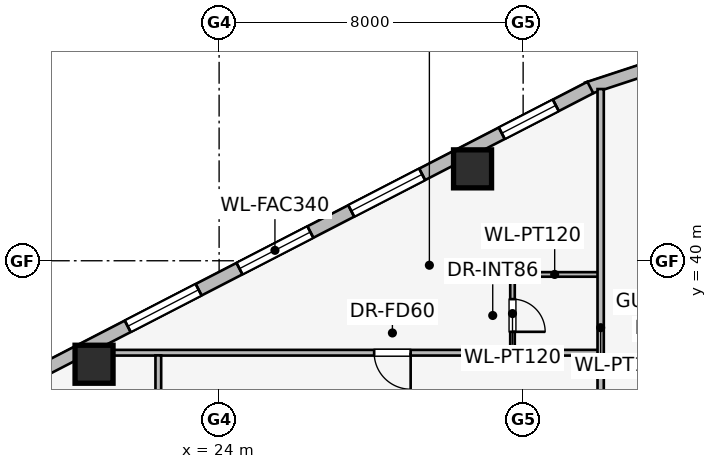
"""IFC4 building model, lengths in metres.
Left out: names, types, materials, properties, quantities, classifications, styles, units other than length and angle.
Written with IfcOpenShell. Run it as: python <this file> out.ifc"""

import sys

from ifc_helpers import new_model, si_unit, direction, frame, frame_2d, origin, origin_2d, place, context, subcontext, project, spatial, rectangle, extrude, element, fill, save


model = new_model("IFC4")
c1 = context("Model", 3, precision=1e-05, world=origin(), true_north=direction((0.0, 1.0)))
c2 = subcontext(c1, "Body", "Model", "MODEL_VIEW")
j1 = project(units=[si_unit("LENGTHUNIT", "METRE"), si_unit("PLANEANGLEUNIT", "RADIAN")], contexts=[c1])
p1 = place(None, origin())
s1 = spatial("IfcSite", under=j1, at=p1, CompositionType="ELEMENT")
p2 = place(p1, origin())
s2 = spatial("IfcBuilding", under=s1, at=p2, CompositionType="ELEMENT")
p3 = place(p2, frame((0.0, 0.0, 122.25)))
s3 = spatial("IfcBuildingStorey", under=s2, at=p3, CompositionType="ELEMENT", Elevation=122.25)
for number, where, z_axis, x_axis in (
    (1, (30.669, 42.418, 0.0), (0.0, 0.0, 1.0), (1.0, 0.0, 0.0)),
    (2, (20.709, 37.277, 0.0), (0.0, 0.0, 1.0), (1.0, 0.0, 0.0)),
):
    element("IfcColumn", number, at=place(p3, frame(where, z_axis=z_axis, x_axis=x_axis)), inside=s3, PredefinedType="COLUMN", context=c2, shape_type="SweptSolid", body=[
        extrude(rectangle(XDim=1.0, YDim=1.0, at=origin_2d()), origin(), (0.0, 0.0, 1.0), 3.45),
    ])
p4 = place(p3, frame((33.681, 44.532, 0.0), z_axis=(0.0, 0.0, 1.0), x_axis=(0.949937416267, 0.312440242569, 0.0)))
e3 = element("IfcWall", 3, at=p4, inside=s3, PredefinedType="STANDARD", context=c2, shape_type="SweptSolid", body=[
    extrude(rectangle(XDim=1.722, YDim=0.33, at=frame_2d((0.861, 0.0))), origin(), (0.0, 0.0, 1.0), 3.19),
])
p5 = place(p3, frame((17.169, 35.99, 0.0), z_axis=(0.0, 0.0, 1.0), x_axis=(0.888613612362, 0.458656568606, 0.0)))
e4 = element("IfcWall", 4, at=p5, inside=s3, PredefinedType="STANDARD", context=c2, shape_type="SweptSolid", body=[
    extrude(rectangle(XDim=18.681, YDim=0.34, at=frame_2d((9.34, 0.0))), origin(), (0.0, 0.0, 1.0), 3.19),
])
p6 = place(p5, frame((1.023, 0.0, 0.75)))
e5 = element("IfcOpeningElement", 5, at=p6, cuts=e4, PredefinedType="OPENING", context=c2, shape_type="SweptSolid", body=[
    extrude(rectangle(XDim=1.6, YDim=1.55, at=frame_2d((0.8, 0.775))), frame((0.0, 0.18, 0.0), z_axis=(0.0, -1.0, 0.0), x_axis=(1.0, 0.0, 0.0)), (0.0, 0.0, 1.0), 0.36),
])
p7 = place(p5, frame((4.981, 0.0, 0.75)))
e6 = element("IfcOpeningElement", 6, at=p7, cuts=e4, PredefinedType="OPENING", context=c2, shape_type="SweptSolid", body=[
    extrude(rectangle(XDim=2.1, YDim=1.5, at=frame_2d((1.05, 0.75))), frame((0.0, 0.18, 0.0), z_axis=(0.0, -1.0, 0.0), x_axis=(1.0, 0.0, 0.0)), (0.0, 0.0, 1.0), 0.36),
])
p8 = place(p5, frame((8.29, 0.0, 0.75)))
e7 = element("IfcOpeningElement", 7, at=p8, cuts=e4, PredefinedType="OPENING", context=c2, shape_type="SweptSolid", body=[
    extrude(rectangle(XDim=2.1, YDim=1.5, at=frame_2d((1.05, 0.75))), frame((0.0, 0.18, 0.0), z_axis=(0.0, -1.0, 0.0), x_axis=(1.0, 0.0, 0.0)), (0.0, 0.0, 1.0), 0.36),
])
p9 = place(p5, frame((11.6, 0.0, 0.75)))
e8 = element("IfcOpeningElement", 8, at=p9, cuts=e4, PredefinedType="OPENING", context=c2, shape_type="SweptSolid", body=[
    extrude(rectangle(XDim=2.1, YDim=1.5, at=frame_2d((1.05, 0.75))), frame((0.0, 0.18, 0.0), z_axis=(0.0, -1.0, 0.0), x_axis=(1.0, 0.0, 0.0)), (0.0, 0.0, 1.0), 0.36),
])
p10 = place(p5, frame((16.058, 0.0, 0.75)))
e9 = element("IfcOpeningElement", 9, at=p10, cuts=e4, PredefinedType="OPENING", context=c2, shape_type="SweptSolid", body=[
    extrude(rectangle(XDim=1.6, YDim=1.55, at=frame_2d((0.8, 0.775))), frame((0.0, 0.18, 0.0), z_axis=(0.0, -1.0, 0.0), x_axis=(1.0, 0.0, 0.0)), (0.0, 0.0, 1.0), 0.36),
])
p11 = place(p3, frame((34.0, 39.64, 0.0), z_axis=(0.0, 0.0, 1.0), x_axis=(-1.0, 0.0, 0.0)))
e10 = element("IfcWall", 10, at=p11, inside=s3, PredefinedType="PARTITIONING", context=c2, shape_type="SweptSolid", body=[
    extrude(rectangle(XDim=2.34, YDim=0.12, at=frame_2d((1.17, 0.0))), origin(), (0.0, 0.0, 1.0), 3.19),
])
p12 = place(p3, frame((31.72, 39.64, 0.0), z_axis=(0.0, 0.0, 1.0), x_axis=(0.0, -1.0, 0.0)))
e11 = element("IfcWall", 11, at=p12, inside=s3, PredefinedType="PARTITIONING", context=c2, shape_type="SweptSolid", body=[
    extrude(rectangle(XDim=2.06, YDim=0.12, at=frame_2d((1.03, 0.0))), origin(), (0.0, 0.0, 1.0), 3.19),
])
p13 = place(p12, frame((0.65, 0.0, 0.0)))
e12 = element("IfcOpeningElement", 12, at=p13, cuts=e11, PredefinedType="OPENING", context=c2, shape_type="SweptSolid", body=[
    extrude(rectangle(XDim=0.86, YDim=2.0, at=frame_2d((0.43, 1.0))), frame((0.0, 0.07, 0.0), z_axis=(0.0, -1.0, 0.0), x_axis=(1.0, 0.0, 0.0)), (0.0, 0.0, 1.0), 0.14),
])
p14 = place(p3, frame((34.0, 37.58, 0.0), z_axis=(0.0, 0.0, 1.0), x_axis=(-1.0, 0.0, 0.0)))
e13 = element("IfcWall", 13, at=p14, inside=s3, PredefinedType="PARTITIONING", context=c2, shape_type="SweptSolid", body=[
    extrude(rectangle(XDim=13.707, YDim=0.15, at=frame_2d((6.854, 0.0))), origin(), (0.0, 0.0, 1.0), 3.19),
])
p15 = place(p14, frame((4.96, 0.0, 0.0)))
e14 = element("IfcOpeningElement", 14, at=p15, cuts=e13, PredefinedType="OPENING", context=c2, shape_type="SweptSolid", body=[
    extrude(rectangle(XDim=0.96, YDim=2.0, at=frame_2d((0.48, 1.0))), frame((0.0, 0.085, 0.0), z_axis=(0.0, -1.0, 0.0), x_axis=(1.0, 0.0, 0.0)), (0.0, 0.0, 1.0), 0.17),
])
p16 = place(p3, frame((34.04, 31.96, 0.0), z_axis=(0.0, 0.0, 1.0), x_axis=(0.0, 1.0, 0.0)))
e15 = element("IfcWall", 15, at=p16, inside=s3, PredefinedType="PARTITIONING", context=c2, shape_type="SweptSolid", body=[
    extrude(rectangle(XDim=12.558, YDim=0.165, at=frame_2d((6.279, 0.0))), origin(), (0.0, 0.0, 1.0), 3.19),
])
p17 = place(p3, frame((22.4, 36.08, 0.0), z_axis=(0.0, 0.0, 1.0), x_axis=(0.0, 1.0, 0.0)))
e16 = element("IfcWall", 16, at=p17, inside=s3, PredefinedType="PARTITIONING", context=c2, shape_type="SweptSolid", body=[
    extrude(rectangle(XDim=1.43, YDim=0.15, at=frame_2d((0.715, 0.0))), origin(), (0.0, 0.0, 1.0), 3.19),
])
p18 = place(p7, origin())
e17 = element("IfcWindow", 17, at=p18, inside=s3, PartitioningType="SINGLE_PANEL", PredefinedType="WINDOW", context=c2, shape_type="SweptSolid", body=[
    extrude(rectangle(XDim=2.1, YDim=1.5, at=frame_2d((1.05, 0.75))), frame((0.0, 0.03, 0.0), z_axis=(0.0, -1.0, 0.0), x_axis=(1.0, 0.0, 0.0)), (0.0, 0.0, 1.0), 0.06),
])
fill(e6, e17)
p19 = place(p8, origin())
e18 = element("IfcWindow", 18, at=p19, inside=s3, PartitioningType="SINGLE_PANEL", PredefinedType="WINDOW", context=c2, shape_type="SweptSolid", body=[
    extrude(rectangle(XDim=2.1, YDim=1.5, at=frame_2d((1.05, 0.75))), frame((0.0, 0.03, 0.0), z_axis=(0.0, -1.0, 0.0), x_axis=(1.0, 0.0, 0.0)), (0.0, 0.0, 1.0), 0.06),
])
fill(e7, e18)
p20 = place(p9, origin())
e19 = element("IfcWindow", 19, at=p20, inside=s3, PartitioningType="SINGLE_PANEL", PredefinedType="WINDOW", context=c2, shape_type="SweptSolid", body=[
    extrude(rectangle(XDim=2.1, YDim=1.5, at=frame_2d((1.05, 0.75))), frame((0.0, 0.03, 0.0), z_axis=(0.0, -1.0, 0.0), x_axis=(1.0, 0.0, 0.0)), (0.0, 0.0, 1.0), 0.06),
])
fill(e8, e19)
p21 = place(p10, origin())
e20 = element("IfcWindow", 20, at=p21, inside=s3, PartitioningType="SINGLE_PANEL", PredefinedType="WINDOW", context=c2, shape_type="SweptSolid", body=[
    extrude(rectangle(XDim=1.6, YDim=1.55, at=frame_2d((0.8, 0.775))), frame((0.0, 0.03, 0.0), z_axis=(0.0, -1.0, 0.0), x_axis=(1.0, 0.0, 0.0)), (0.0, 0.0, 1.0), 0.06),
])
fill(e9, e20)
p22 = place(p13, origin())
e21 = element("IfcDoor", 21, at=p22, inside=s3, OperationType="SINGLE_SWING_RIGHT", PredefinedType="DOOR", context=c2, shape_type="SweptSolid", body=[
    extrude(rectangle(XDim=0.86, YDim=2.0, at=frame_2d((0.43, 1.0))), frame((0.0, 0.025, 0.0), z_axis=(0.0, -1.0, 0.0), x_axis=(1.0, 0.0, 0.0)), (0.0, 0.0, 1.0), 0.05),
])
fill(e12, e21)
p23 = place(p15, origin())
e22 = element("IfcDoor", 22, at=p23, inside=s3, OperationType="SINGLE_SWING_LEFT", PredefinedType="DOOR", context=c2, shape_type="SweptSolid", body=[
    extrude(rectangle(XDim=0.96, YDim=2.0, at=frame_2d((0.48, 1.0))), frame((0.0, 0.025, 0.0), z_axis=(0.0, -1.0, 0.0), x_axis=(1.0, 0.0, 0.0)), (0.0, 0.0, 1.0), 0.05),
])
fill(e14, e22)
save(model, sys.argv[1])
